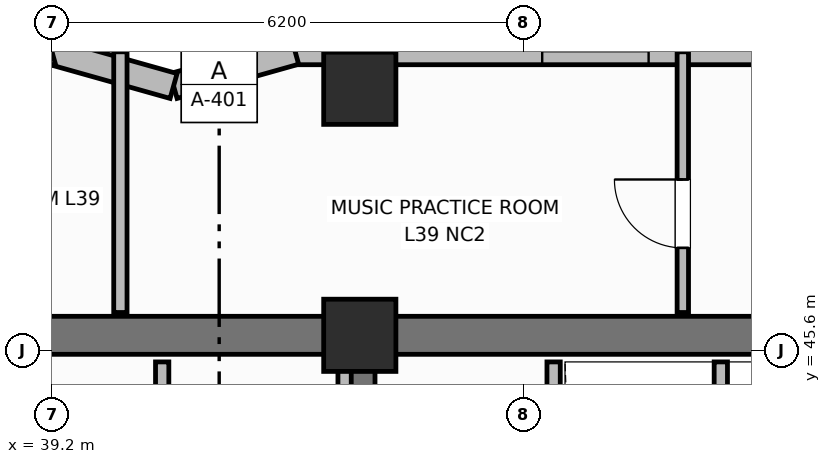
"""IFC4 building model, lengths in metres.
Left out: names, types, materials, properties, quantities, classifications, styles, units other than length and angle.
Written with IfcOpenShell. Run it as: python <this file> out.ifc"""

import sys

from ifc_helpers import new_model, si_unit, direction, frame, frame_2d, origin, origin_2d, place, context, subcontext, project, spatial, rectangle, extrude, element, fill, save


model = new_model("IFC4")
c1 = context("Model", 3, precision=1e-05, world=origin(), true_north=direction((0.0, 1.0)))
c2 = subcontext(c1, "Body", "Model", "MODEL_VIEW")
j1 = project(units=[si_unit("LENGTHUNIT", "METRE"), si_unit("PLANEANGLEUNIT", "RADIAN")], contexts=[c1])
p1 = place(None, origin())
s1 = spatial("IfcSite", under=j1, at=p1, CompositionType="ELEMENT")
p2 = place(p1, origin())
s2 = spatial("IfcBuilding", under=s1, at=p2, CompositionType="ELEMENT")
p3 = place(p2, frame((0.0, 0.0, 158.9)))
s3 = spatial("IfcBuildingStorey", under=s2, at=p3, CompositionType="ELEMENT", Elevation=158.9)
p4 = place(p3, frame((25.6, 45.8, 0.0), z_axis=(0.0, 0.0, 1.0), x_axis=(1.0, 0.0, 0.0)))
e1 = element("IfcWall", 1, at=p4, inside=s3, PredefinedType="SHEAR", context=c2, shape_type="SweptSolid", body=[
    extrude(rectangle(XDim=27.2, YDim=0.5, at=frame_2d((13.6, 0.0))), origin(), (0.0, 0.0, 1.0), 3.7),
])
p5 = place(p3, frame((43.25, 39.85, 0.0), z_axis=(0.0, 0.0, 1.0), x_axis=(0.0, 1.0, 0.0)))
e2 = element("IfcWall", 2, at=p5, inside=s3, PredefinedType="SHEAR", context=c2, shape_type="SweptSolid", body=[
    extrude(rectangle(XDim=5.7, YDim=0.4, at=frame_2d((2.85, 0.0))), origin(), (0.0, 0.0, 1.0), 3.7),
])
for number, where, z_axis, x_axis in (
    (3, (43.25, 45.8, 0.0), (0.0, 0.0, 1.0), (1.0, 0.0, 0.0)),
    (4, (43.25, 49.05, 0.0), (0.0, 0.0, 1.0), (1.0, 0.0, 0.0)),
):
    element("IfcColumn", number, at=place(p3, frame(where, z_axis=z_axis, x_axis=x_axis)), inside=s3, PredefinedType="COLUMN", context=c2, shape_type="SweptSolid", body=[
        extrude(rectangle(XDim=0.95, YDim=0.95, at=origin_2d()), origin(), (0.0, 0.0, 1.0), 3.7),
    ])
p6 = place(p3, frame((58.2, 49.53, 0.0), z_axis=(0.0, 0.0, 1.0), x_axis=(-1.0, 0.0, 0.0)))
e5 = element("IfcWall", 5, at=p6, inside=s3, PredefinedType="SOLIDWALL", context=c2, shape_type="SweptSolid", body=[
    extrude(rectangle(XDim=15.8, YDim=0.34, at=frame_2d((7.9, 0.0))), origin(), (0.0, 0.0, 1.0), 2.72),
])
p7 = place(p6, frame((1.4, 0.0, 0.75)))
e6 = element("IfcOpeningElement", 6, at=p7, cuts=e5, PredefinedType="OPENING", context=c2, shape_type="SweptSolid", body=[
    extrude(rectangle(XDim=1.4, YDim=1.85, at=frame_2d((0.7, 0.925))), frame((0.0, 0.18, 0.0), z_axis=(0.0, -1.0, 0.0), x_axis=(1.0, 0.0, 0.0)), (0.0, 0.0, 1.0), 0.36),
])
p8 = place(p6, frame((7.2, 0.0, 0.75)))
e7 = element("IfcOpeningElement", 7, at=p8, cuts=e5, PredefinedType="OPENING", context=c2, shape_type="SweptSolid", body=[
    extrude(rectangle(XDim=1.4, YDim=1.85, at=frame_2d((0.7, 0.925))), frame((0.0, 0.18, 0.0), z_axis=(0.0, -1.0, 0.0), x_axis=(1.0, 0.0, 0.0)), (0.0, 0.0, 1.0), 0.36),
])
p9 = place(p6, frame((11.15, 0.0, 0.75)))
e8 = element("IfcOpeningElement", 8, at=p9, cuts=e5, PredefinedType="OPENING", context=c2, shape_type="SweptSolid", body=[
    extrude(rectangle(XDim=1.4, YDim=1.85, at=frame_2d((0.7, 0.925))), frame((0.0, 0.18, 0.0), z_axis=(0.0, -1.0, 0.0), x_axis=(1.0, 0.0, 0.0)), (0.0, 0.0, 1.0), 0.36),
])
p10 = place(p3, frame((42.4, 49.53, 0.0), z_axis=(0.0, 0.0, 1.0), x_axis=(-0.962652136636, -0.270741322725, 0.0)))
e9 = element("IfcWall", 9, at=p10, inside=s3, PredefinedType="SOLIDWALL", context=c2, shape_type="SweptSolid", body=[
    extrude(rectangle(XDim=1.662, YDim=0.34, at=frame_2d((0.831, 0.0))), origin(), (0.0, 0.0, 1.0), 2.72),
])
p11 = place(p3, frame((40.8, 49.08, 0.0), z_axis=(0.0, 0.0, 1.0), x_axis=(-0.962662902433, 0.270703040766, 0.0)))
e10 = element("IfcWall", 10, at=p11, inside=s3, PredefinedType="SOLIDWALL", context=c2, shape_type="SweptSolid", body=[
    extrude(rectangle(XDim=1.662, YDim=0.34, at=frame_2d((0.831, 0.0))), origin(), (0.0, 0.0, 1.0), 2.72),
])
p12 = place(p3, frame((39.2, 49.53, 0.0), z_axis=(0.0, 0.0, 1.0), x_axis=(-0.962652136636, -0.270741322725, 0.0)))
e11 = element("IfcWall", 11, at=p12, inside=s3, PredefinedType="SOLIDWALL", context=c2, shape_type="SweptSolid", body=[
    extrude(rectangle(XDim=1.662, YDim=0.34, at=frame_2d((0.831, 0.0))), origin(), (0.0, 0.0, 1.0), 2.72),
])
for number, where, z_axis, x_axis in (
    (12, (43.05, 39.82, 0.0), (0.0, 0.0, 1.0), (0.0, 1.0, 0.0)),
    (13, (40.65, 39.82, 0.0), (0.0, 0.0, 1.0), (0.0, 1.0, 0.0)),
    (14, (45.8, 39.82, 0.0), (0.0, 0.0, 1.0), (0.0, 1.0, 0.0)),
):
    element("IfcWall", number, at=place(p3, frame(where, z_axis=z_axis, x_axis=x_axis)), inside=s3, PredefinedType="PARTITIONING", context=c2, shape_type="SweptSolid", body=[
        extrude(rectangle(XDim=5.63, YDim=0.175, at=frame_2d((2.815, 0.0))), origin(), (0.0, 0.0, 1.0), 2.55),
    ])
p13 = place(p3, frame((48.0, 42.65, 0.0), z_axis=(0.0, 0.0, 1.0), x_axis=(0.0, 1.0, 0.0)))
e15 = element("IfcWall", 15, at=p13, inside=s3, PredefinedType="PARTITIONING", context=c2, shape_type="SweptSolid", body=[
    extrude(rectangle(XDim=2.8, YDim=0.175, at=frame_2d((1.4, 0.0))), origin(), (0.0, 0.0, 1.0), 2.55),
])
p14 = place(p3, frame((40.1, 46.1, 0.0), z_axis=(0.0, 0.0, 1.0), x_axis=(0.0, 1.0, 0.0)))
e16 = element("IfcWall", 16, at=p14, inside=s3, PredefinedType="PARTITIONING", context=c2, shape_type="SweptSolid", body=[
    extrude(rectangle(XDim=3.43, YDim=0.175, at=frame_2d((1.715, 0.0))), origin(), (0.0, 0.0, 1.0), 2.55),
])
p15 = place(p3, frame((47.5, 46.1, 0.0), z_axis=(0.0, 0.0, 1.0), x_axis=(0.0, 1.0, 0.0)))
e17 = element("IfcWall", 17, at=p15, inside=s3, PredefinedType="PARTITIONING", context=c2, shape_type="SweptSolid", body=[
    extrude(rectangle(XDim=3.43, YDim=0.15, at=frame_2d((1.715, 0.0))), origin(), (0.0, 0.0, 1.0), 2.55),
])
p16 = place(p15, frame((0.85, 0.0, 0.0)))
e18 = element("IfcOpeningElement", 18, at=p16, cuts=e17, PredefinedType="OPENING", context=c2, shape_type="SweptSolid", body=[
    extrude(rectangle(XDim=0.9, YDim=2.1, at=frame_2d((0.45, 1.05))), frame((0.0, 0.085, 0.0), z_axis=(0.0, -1.0, 0.0), x_axis=(1.0, 0.0, 0.0)), (0.0, 0.0, 1.0), 0.17),
])
p17 = place(p9, origin())
e19 = element("IfcWindow", 19, at=p17, inside=s3, PartitioningType="SINGLE_PANEL", PredefinedType="WINDOW", context=c2, shape_type="SweptSolid", body=[
    extrude(rectangle(XDim=1.4, YDim=1.85, at=frame_2d((0.7, 0.925))), frame((0.0, 0.03, 0.0), z_axis=(0.0, -1.0, 0.0), x_axis=(1.0, 0.0, 0.0)), (0.0, 0.0, 1.0), 0.06),
])
fill(e8, e19)
p18 = place(p16, origin())
e20 = element("IfcDoor", 20, at=p18, inside=s3, OperationType="SINGLE_SWING_RIGHT", PredefinedType="DOOR", context=c2, shape_type="SweptSolid", body=[
    extrude(rectangle(XDim=0.9, YDim=2.1, at=frame_2d((0.45, 1.05))), frame((0.0, 0.025, 0.0), z_axis=(0.0, -1.0, 0.0), x_axis=(1.0, 0.0, 0.0)), (0.0, 0.0, 1.0), 0.05),
])
fill(e18, e20)
save(model, sys.argv[1])
